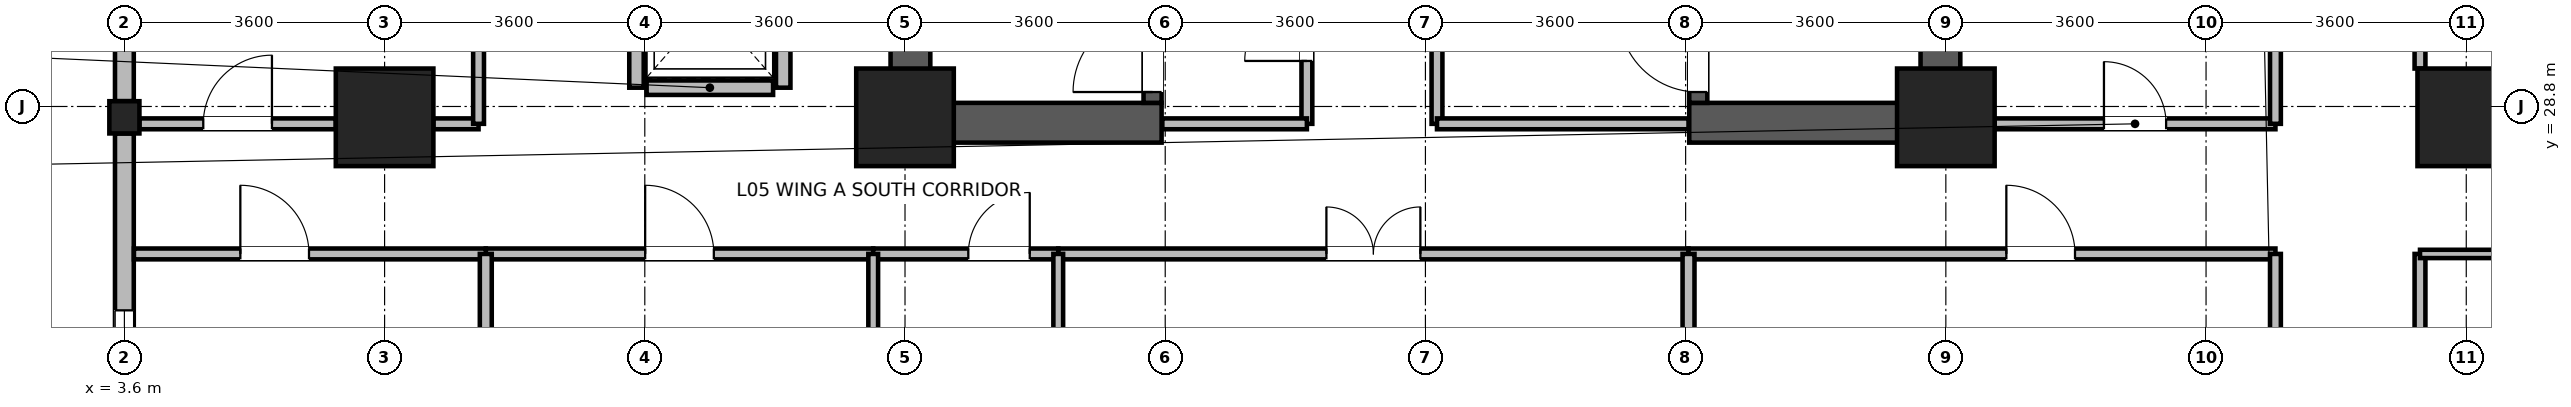
"""IFC4 building model, lengths in metres.
Left out: names, types, materials, properties, quantities, classifications, styles, units other than length and angle.
Written with IfcOpenShell. Run it as: python <this file> out.ifc"""

import sys

from ifc_helpers import new_model, si_unit, direction, frame, frame_2d, origin, origin_2d, place, context, subcontext, project, spatial, rectangle, i_section, extrude, source, transform, mapped, element, fill, save


model = new_model("IFC4")
c1 = context("Model", 3, precision=1e-05, world=origin(), true_north=direction((0.0, 1.0)))
c2 = subcontext(c1, "Body", "Model", "MODEL_VIEW")
j1 = project(units=[si_unit("LENGTHUNIT", "METRE"), si_unit("PLANEANGLEUNIT", "RADIAN")], contexts=[c1])
p1 = place(None, origin())
s1 = spatial("IfcSite", under=j1, at=p1, CompositionType="ELEMENT")
p2 = place(p1, origin())
s2 = spatial("IfcBuilding", under=s1, at=p2, CompositionType="ELEMENT")
p3 = place(p2, frame((0.0, 0.0, 25.3)))
s3 = spatial("IfcBuildingStorey", under=s2, at=p3, CompositionType="ELEMENT", Elevation=25.3)
for number, where, z_axis, x_axis in (
    (1, (14.475, 28.3, 0.0), (0.0, 0.0, 1.0), (0.0, 1.0, 0.0)),
    (2, (28.725, 28.3, 0.0), (0.0, 0.0, 1.0), (0.0, 1.0, 0.0)),
):
    element("IfcWall", number, at=place(p3, frame(where, z_axis=z_axis, x_axis=x_axis)), inside=s3, PredefinedType="SHEAR", context=c2, shape_type="SweptSolid", body=[
        extrude(rectangle(XDim=8.1, YDim=0.55, at=frame_2d((4.05, 0.0))), origin(), (0.0, 0.0, 1.0), 3.45),
    ])
for number, where, z_axis, x_axis in (
    (3, (14.75, 28.575, 0.0), (0.0, 0.0, 1.0), (1.0, 0.0, 0.0)),
    (4, (25.25, 28.575, 0.0), (0.0, 0.0, 1.0), (1.0, 0.0, 0.0)),
):
    element("IfcWall", number, at=place(p3, frame(where, z_axis=z_axis, x_axis=x_axis)), inside=s3, PredefinedType="SHEAR", context=c2, shape_type="SweptSolid", body=[
        extrude(rectangle(XDim=3.2, YDim=0.55, at=frame_2d((1.6, 0.0))), origin(), (0.0, 0.0, 1.0), 3.45),
    ])
p4 = place(p3, frame((17.825, 28.85, 0.0), z_axis=(0.0, 0.0, 1.0), x_axis=(0.0, 1.0, 0.0)))
e5 = element("IfcWall", 5, at=p4, inside=s3, PredefinedType="SHEAR", context=c2, shape_type="SweptSolid", body=[
    extrude(rectangle(XDim=7.0, YDim=0.25, at=frame_2d((3.5, 0.0))), origin(), (0.0, 0.0, 1.0), 3.45),
])
p5 = place(p4, frame((0.15, 0.0, 0.0)))
e6 = element("IfcOpeningElement", 6, at=p5, cuts=e5, PredefinedType="OPENING", context=c2, shape_type="SweptSolid", body=[
    extrude(rectangle(XDim=1.1, YDim=2.08, at=frame_2d((0.55, 1.04))), frame((0.0, 0.135, 0.0), z_axis=(0.0, -1.0, 0.0), x_axis=(1.0, 0.0, 0.0)), (0.0, 0.0, 1.0), 0.27),
])
p6 = place(p3, frame((25.375, 28.85, 0.0), z_axis=(0.0, 0.0, 1.0), x_axis=(0.0, 1.0, 0.0)))
e7 = element("IfcWall", 7, at=p6, inside=s3, PredefinedType="SHEAR", context=c2, shape_type="SweptSolid", body=[
    extrude(rectangle(XDim=7.0, YDim=0.25, at=frame_2d((3.5, 0.0))), origin(), (0.0, 0.0, 1.0), 3.45),
])
p7 = place(p6, frame((0.15, 0.0, 0.0)))
e8 = element("IfcOpeningElement", 8, at=p7, cuts=e7, PredefinedType="OPENING", context=c2, shape_type="SweptSolid", body=[
    extrude(rectangle(XDim=1.1, YDim=2.08, at=frame_2d((0.55, 1.04))), frame((0.0, 0.135, 0.0), z_axis=(0.0, -1.0, 0.0), x_axis=(1.0, 0.0, 0.0)), (0.0, 0.0, 1.0), 0.27),
])
m1 = source(origin(), c2, "Body", "SweptSolid", [
    extrude(rectangle(XDim=1.35, YDim=1.35, at=origin_2d()), origin(), (0.0, 0.0, 1.0), 3.7),
])
for number, where, z_axis, x_axis in (
    (9, (7.2, 28.65, 0.0), (0.0, 0.0, 1.0), (1.0, 0.0, 0.0)),
    (10, (14.4, 28.65, 0.0), (0.0, 0.0, 1.0), (1.0, 0.0, 0.0)),
    (11, (28.8, 28.65, 0.0), (0.0, 0.0, 1.0), (1.0, 0.0, 0.0)),
    (12, (36.0, 28.65, 0.0), (0.0, 0.0, 1.0), (1.0, 0.0, 0.0)),
):
    element("IfcColumn", number, at=place(p3, frame(where, z_axis=z_axis, x_axis=x_axis)), inside=s3, PredefinedType="COLUMN", context=c2, shape_type="MappedRepresentation", body=[
        mapped(m1, transform((0.0, 0.0, 0.0), x_axis=(1.0, 0.0, 0.0), y_axis=(0.0, 1.0, 0.0), z_axis=(0.0, 0.0, 1.0), scale=1.0)),
    ])
m2 = source(origin(), c2, "Body", "SweptSolid", [
    extrude(i_section(OverallWidth=0.416, OverallDepth=0.446, WebThickness=0.029, FlangeThickness=0.04, FilletRadius=0.015, at=origin_2d()), origin(), (0.0, 0.0, 1.0), 3.7),
])
p8 = place(p3, frame((3.6, 28.65, 0.0), z_axis=(0.0, 0.0, 1.0), x_axis=(1.0, 0.0, 0.0)))
e13 = element("IfcColumn", 13, at=p8, inside=s3, PredefinedType="COLUMN", context=c2, shape_type="MappedRepresentation", body=[
    mapped(m2, transform((0.0, 0.0, 0.0), x_axis=(1.0, 0.0, 0.0), y_axis=(0.0, 1.0, 0.0), z_axis=(0.0, 0.0, 1.0), scale=1.0)),
])
p9 = place(p3, frame((3.6, 28.874, 0.0), z_axis=(0.0, 0.0, 1.0), x_axis=(0.0, 1.0, 0.0)))
e14 = element("IfcWall", 14, at=p9, inside=s3, PredefinedType="STANDARD", context=c2, shape_type="SweptSolid", body=[
    extrude(rectangle(XDim=7.052, YDim=0.26, at=frame_2d((3.526, 0.0))), origin(), (0.0, 0.0, 1.0), 2.93),
])
p10 = place(p9, frame((0.863, 0.0, 0.85)))
e15 = element("IfcOpeningElement", 15, at=p10, cuts=e14, PredefinedType="OPENING", context=c2, shape_type="SweptSolid", body=[
    extrude(rectangle(XDim=1.8, YDim=1.85, at=frame_2d((0.9, 0.925))), frame((0.0, 0.14, 0.0), z_axis=(0.0, -1.0, 0.0), x_axis=(1.0, 0.0, 0.0)), (0.0, 0.0, 1.0), 0.28),
])
p11 = place(p9, frame((4.389, 0.0, 0.85)))
e16 = element("IfcOpeningElement", 16, at=p11, cuts=e14, PredefinedType="OPENING", context=c2, shape_type="SweptSolid", body=[
    extrude(rectangle(XDim=1.8, YDim=1.85, at=frame_2d((0.9, 0.925))), frame((0.0, 0.14, 0.0), z_axis=(0.0, -1.0, 0.0), x_axis=(1.0, 0.0, 0.0)), (0.0, 0.0, 1.0), 0.28),
])
p12 = place(p3, frame((3.6, 21.47, 0.0), z_axis=(0.0, 0.0, 1.0), x_axis=(0.0, 1.0, 0.0)))
e17 = element("IfcWall", 17, at=p12, inside=s3, PredefinedType="STANDARD", context=c2, shape_type="SweptSolid", body=[
    extrude(rectangle(XDim=6.956, YDim=0.26, at=frame_2d((3.478, 0.0))), origin(), (0.0, 0.0, 1.0), 3.43),
])
p13 = place(p12, frame((0.389, 0.0, 0.85)))
e18 = element("IfcOpeningElement", 18, at=p13, cuts=e17, PredefinedType="OPENING", context=c2, shape_type="SweptSolid", body=[
    extrude(rectangle(XDim=2.7, YDim=2.05, at=frame_2d((1.35, 1.025))), frame((0.0, 0.14, 0.0), z_axis=(0.0, -1.0, 0.0), x_axis=(1.0, 0.0, 0.0)), (0.0, 0.0, 1.0), 0.28),
])
p14 = place(p12, frame((3.56, 0.0, 0.85)))
e19 = element("IfcOpeningElement", 19, at=p14, cuts=e17, PredefinedType="OPENING", context=c2, shape_type="SweptSolid", body=[
    extrude(rectangle(XDim=0.95, YDim=1.75, at=frame_2d((0.475, 0.875))), frame((0.0, 0.14, 0.0), z_axis=(0.0, -1.0, 0.0), x_axis=(1.0, 0.0, 0.0)), (0.0, 0.0, 1.0), 0.28),
])
p15 = place(p3, frame((10.825, 29.06, 0.0), z_axis=(0.0, 0.0, 1.0), x_axis=(1.0, 0.0, 0.0)))
e20 = element("IfcWall", 20, at=p15, inside=s3, PredefinedType="PARTITIONING", context=c2, shape_type="SweptSolid", body=[
    extrude(rectangle(XDim=1.75, YDim=0.2, at=frame_2d((0.875, 0.0))), origin(), (0.0, 0.0, 1.0), 3.43),
])
for number, where, z_axis, x_axis in (
    (21, (10.685, 29.06, 0.0), (0.0, 0.0, 1.0), (0.0, 1.0, 0.0)),
    (22, (12.715, 29.06, 0.0), (0.0, 0.0, 1.0), (0.0, 1.0, 0.0)),
):
    element("IfcWall", number, at=place(p3, frame(where, z_axis=z_axis, x_axis=x_axis)), inside=s3, PredefinedType="PARTITIONING", context=c2, shape_type="SweptSolid", body=[
        extrude(rectangle(XDim=2.28, YDim=0.2, at=frame_2d((1.14, 0.0))), origin(), (0.0, 0.0, 1.0), 3.43),
    ])
p16 = place(p3, frame((35.36, 22.275, 0.0), z_axis=(0.0, 0.0, 1.0), x_axis=(0.0, 1.0, 0.0)))
e23 = element("IfcWall", 23, at=p16, inside=s3, PredefinedType="PARTITIONING", context=c2, shape_type="SweptSolid", body=[
    extrude(rectangle(XDim=4.485, YDim=0.15, at=frame_2d((2.243, 0.0))), origin(), (0.0, 0.0, 1.0), 3.43),
])
p17 = place(p3, frame((16.52, 26.76, 0.0), z_axis=(0.0, 0.0, 1.0), x_axis=(1.0, 0.0, 0.0)))
e24 = element("IfcWall", 24, at=p17, inside=s3, PredefinedType="PARTITIONING", context=c2, shape_type="SweptSolid", body=[
    extrude(rectangle(XDim=8.72, YDim=0.15, at=frame_2d((4.36, 0.0))), origin(), (0.0, 0.0, 1.0), 3.43),
])
p18 = place(p17, frame((3.71, 0.0, 0.0)))
e25 = element("IfcOpeningElement", 25, at=p18, cuts=e24, PredefinedType="OPENING", context=c2, shape_type="SweptSolid", body=[
    extrude(rectangle(XDim=1.3, YDim=2.12, at=frame_2d((0.65, 1.06))), frame((0.0, 0.085, 0.0), z_axis=(0.0, -1.0, 0.0), x_axis=(1.0, 0.0, 0.0)), (0.0, 0.0, 1.0), 0.17),
])
p19 = place(p3, frame((25.24, 26.76, 0.0), z_axis=(0.0, 0.0, 1.0), x_axis=(1.0, 0.0, 0.0)))
e26 = element("IfcWall", 26, at=p19, inside=s3, PredefinedType="PARTITIONING", context=c2, shape_type="SweptSolid", body=[
    extrude(rectangle(XDim=8.12, YDim=0.15, at=frame_2d((4.06, 0.0))), origin(), (0.0, 0.0, 1.0), 3.43),
])
p20 = place(p19, frame((4.397, 0.0, 0.0)))
e27 = element("IfcOpeningElement", 27, at=p20, cuts=e26, PredefinedType="OPENING", context=c2, shape_type="SweptSolid", body=[
    extrude(rectangle(XDim=0.95, YDim=2.1, at=frame_2d((0.475, 1.05))), frame((0.0, 0.085, 0.0), z_axis=(0.0, -1.0, 0.0), x_axis=(1.0, 0.0, 0.0)), (0.0, 0.0, 1.0), 0.17),
])
p21 = place(p3, frame((35.36, 29.325, 0.0), z_axis=(0.0, 0.0, 1.0), x_axis=(0.0, 1.0, 0.0)))
e28 = element("IfcWall", 28, at=p21, inside=s3, PredefinedType="PARTITIONING", context=c2, shape_type="SweptSolid", body=[
    extrude(rectangle(XDim=6.15, YDim=0.15, at=frame_2d((3.075, 0.0))), origin(), (0.0, 0.0, 1.0), 3.43),
])
p22 = place(p21, frame((2.425, 0.0, 0.0)))
e29 = element("IfcOpeningElement", 29, at=p22, cuts=e28, PredefinedType="OPENING", context=c2, shape_type="SweptSolid", body=[
    extrude(rectangle(XDim=1.3, YDim=2.12, at=frame_2d((0.65, 1.06))), frame((0.0, 0.085, 0.0), z_axis=(0.0, -1.0, 0.0), x_axis=(1.0, 0.0, 0.0)), (0.0, 0.0, 1.0), 0.17),
])
p23 = place(p3, frame((8.6, 26.76, 0.0), z_axis=(0.0, 0.0, 1.0), x_axis=(1.0, 0.0, 0.0)))
e30 = element("IfcWall", 30, at=p23, inside=s3, PredefinedType="PARTITIONING", context=c2, shape_type="SweptSolid", body=[
    extrude(rectangle(XDim=5.36, YDim=0.15, at=frame_2d((2.68, 0.0))), origin(), (0.0, 0.0, 1.0), 3.43),
])
p24 = place(p23, frame((2.205, 0.0, 0.0)))
e31 = element("IfcOpeningElement", 31, at=p24, cuts=e30, PredefinedType="OPENING", context=c2, shape_type="SweptSolid", body=[
    extrude(rectangle(XDim=0.95, YDim=2.1, at=frame_2d((0.475, 1.05))), frame((0.0, 0.085, 0.0), z_axis=(0.0, -1.0, 0.0), x_axis=(1.0, 0.0, 0.0)), (0.0, 0.0, 1.0), 0.17),
])
p25 = place(p3, frame((3.732, 26.76, 0.0), z_axis=(0.0, 0.0, 1.0), x_axis=(1.0, 0.0, 0.0)))
e32 = element("IfcWall", 32, at=p25, inside=s3, PredefinedType="PARTITIONING", context=c2, shape_type="SweptSolid", body=[
    extrude(rectangle(XDim=4.868, YDim=0.15, at=frame_2d((2.434, 0.0))), origin(), (0.0, 0.0, 1.0), 3.43),
])
p26 = place(p25, frame((1.472, 0.0, 0.0)))
e33 = element("IfcOpeningElement", 33, at=p26, cuts=e32, PredefinedType="OPENING", context=c2, shape_type="SweptSolid", body=[
    extrude(rectangle(XDim=0.95, YDim=2.1, at=frame_2d((0.475, 1.05))), frame((0.0, 0.085, 0.0), z_axis=(0.0, -1.0, 0.0), x_axis=(1.0, 0.0, 0.0)), (0.0, 0.0, 1.0), 0.17),
])
p27 = place(p3, frame((3.808, 28.56, 0.0), z_axis=(0.0, 0.0, 1.0), x_axis=(1.0, 0.0, 0.0)))
e34 = element("IfcWall", 34, at=p27, inside=s3, PredefinedType="PARTITIONING", context=c2, shape_type="SweptSolid", body=[
    extrude(rectangle(XDim=2.717, YDim=0.15, at=frame_2d((1.358, 0.0))), origin(), (0.0, 0.0, 1.0), 2.78),
])
p28 = place(p27, frame((0.884, 0.0, 0.0)))
e35 = element("IfcOpeningElement", 35, at=p28, cuts=e34, PredefinedType="OPENING", context=c2, shape_type="SweptSolid", body=[
    extrude(rectangle(XDim=0.95, YDim=2.1, at=frame_2d((0.475, 1.05))), frame((0.0, 0.085, 0.0), z_axis=(0.0, -1.0, 0.0), x_axis=(1.0, 0.0, 0.0)), (0.0, 0.0, 1.0), 0.17),
])
p29 = place(p3, frame((7.875, 28.56, 0.0), z_axis=(0.0, 0.0, 1.0), x_axis=(1.0, 0.0, 0.0)))
e36 = element("IfcWall", 36, at=p29, inside=s3, PredefinedType="PARTITIONING", context=c2, shape_type="SweptSolid", body=[
    extrude(rectangle(XDim=0.625, YDim=0.15, at=frame_2d((0.312, 0.0))), origin(), (0.0, 0.0, 1.0), 2.78),
])
p30 = place(p3, frame((29.475, 28.56, 0.0), z_axis=(0.0, 0.0, 1.0), x_axis=(1.0, 0.0, 0.0)))
e37 = element("IfcWall", 37, at=p30, inside=s3, PredefinedType="PARTITIONING", context=c2, shape_type="SweptSolid", body=[
    extrude(rectangle(XDim=3.885, YDim=0.15, at=frame_2d((1.942, 0.0))), origin(), (0.0, 0.0, 1.0), 2.78),
])
p31 = place(p30, frame((1.512, 0.0, 0.0)))
e38 = element("IfcOpeningElement", 38, at=p31, cuts=e37, PredefinedType="OPENING", context=c2, shape_type="SweptSolid", body=[
    extrude(rectangle(XDim=0.86, YDim=2.02, at=frame_2d((0.43, 1.01))), frame((0.0, 0.085, 0.0), z_axis=(0.0, -1.0, 0.0), x_axis=(1.0, 0.0, 0.0)), (0.0, 0.0, 1.0), 0.17),
])
for number, where, z_axis, x_axis in (
    (39, (8.5, 28.56, 0.0), (0.0, 0.0, 1.0), (0.0, 1.0, 0.0)),
    (40, (33.36, 28.56, 0.0), (0.0, 0.0, 1.0), (0.0, 1.0, 0.0)),
):
    element("IfcWall", number, at=place(p3, frame(where, z_axis=z_axis, x_axis=x_axis)), inside=s3, PredefinedType="PARTITIONING", context=c2, shape_type="SweptSolid", body=[
        extrude(rectangle(XDim=3.84, YDim=0.15, at=frame_2d((1.92, 0.0))), origin(), (0.0, 0.0, 1.0), 3.43),
    ])
p32 = place(p3, frame((33.36, 23.5, 0.0), z_axis=(0.0, 0.0, 1.0), x_axis=(0.0, 1.0, 0.0)))
e41 = element("IfcWall", 41, at=p32, inside=s3, PredefinedType="PARTITIONING", context=c2, shape_type="SweptSolid", body=[
    extrude(rectangle(XDim=3.26, YDim=0.15, at=frame_2d((1.63, 0.0))), origin(), (0.0, 0.0, 1.0), 3.43),
])
p33 = place(p3, frame((19.96, 28.56, 0.0), z_axis=(0.0, 0.0, 1.0), x_axis=(0.0, 1.0, 0.0)))
e42 = element("IfcWall", 42, at=p33, inside=s3, PredefinedType="PARTITIONING", context=c2, shape_type="SweptSolid", body=[
    extrude(rectangle(XDim=2.6, YDim=0.15, at=frame_2d((1.3, 0.0))), origin(), (0.0, 0.0, 1.0), 3.43),
])
p34 = place(p33, frame((0.87, 0.0, 0.0)))
e43 = element("IfcOpeningElement", 43, at=p34, cuts=e42, PredefinedType="OPENING", context=c2, shape_type="SweptSolid", body=[
    extrude(rectangle(XDim=0.86, YDim=2.02, at=frame_2d((0.43, 1.01))), frame((0.0, 0.085, 0.0), z_axis=(0.0, -1.0, 0.0), x_axis=(1.0, 0.0, 0.0)), (0.0, 0.0, 1.0), 0.17),
])
p35 = place(p3, frame((13.96, 26.76, 0.0), z_axis=(0.0, 0.0, 1.0), x_axis=(1.0, 0.0, 0.0)))
e44 = element("IfcWall", 44, at=p35, inside=s3, PredefinedType="PARTITIONING", context=c2, shape_type="SweptSolid", body=[
    extrude(rectangle(XDim=2.56, YDim=0.15, at=frame_2d((1.28, 0.0))), origin(), (0.0, 0.0, 1.0), 3.43),
])
p36 = place(p35, frame((1.316, 0.0, 0.0)))
e45 = element("IfcOpeningElement", 45, at=p36, cuts=e44, PredefinedType="OPENING", context=c2, shape_type="SweptSolid", body=[
    extrude(rectangle(XDim=0.85, YDim=2.04, at=frame_2d((0.425, 1.02))), frame((0.0, 0.085, 0.0), z_axis=(0.0, -1.0, 0.0), x_axis=(1.0, 0.0, 0.0)), (0.0, 0.0, 1.0), 0.17),
])
p37 = place(p3, frame((17.96, 28.56, 0.0), z_axis=(0.0, 0.0, 1.0), x_axis=(1.0, 0.0, 0.0)))
e46 = element("IfcWall", 46, at=p37, inside=s3, PredefinedType="PARTITIONING", context=c2, shape_type="SweptSolid", body=[
    extrude(rectangle(XDim=2.0, YDim=0.15, at=frame_2d((1.0, 0.0))), origin(), (0.0, 0.0, 1.0), 2.23),
])
p38 = place(p3, frame((35.36, 26.76, 0.0), z_axis=(0.0, 0.0, 1.0), x_axis=(1.0, 0.0, 0.0)))
e47 = element("IfcWall", 47, at=p38, inside=s3, PredefinedType="PARTITIONING", context=c2, shape_type="SweptSolid", body=[
    extrude(rectangle(XDim=7.14, YDim=0.115, at=frame_2d((3.57, 0.0))), origin(), (0.0, 0.0, 1.0), 3.43),
])
p39 = place(p3, frame((8.6, 21.732, 0.0), z_axis=(0.0, 0.0, 1.0), x_axis=(0.0, 1.0, 0.0)))
e48 = element("IfcWall", 48, at=p39, inside=s3, PredefinedType="PARTITIONING", context=c2, shape_type="SweptSolid", body=[
    extrude(rectangle(XDim=5.028, YDim=0.165, at=frame_2d((2.514, 0.0))), origin(), (0.0, 0.0, 1.0), 3.43),
])
for number, where, z_axis, x_axis in (
    (49, (13.96, 21.732, 0.0), (0.0, 0.0, 1.0), (0.0, 1.0, 0.0)),
    (50, (16.52, 21.732, 0.0), (0.0, 0.0, 1.0), (0.0, 1.0, 0.0)),
):
    element("IfcWall", number, at=place(p3, frame(where, z_axis=z_axis, x_axis=x_axis)), inside=s3, PredefinedType="PARTITIONING", context=c2, shape_type="SweptSolid", body=[
        extrude(rectangle(XDim=5.028, YDim=0.135, at=frame_2d((2.514, 0.0))), origin(), (0.0, 0.0, 1.0), 3.43),
    ])
p40 = place(p3, frame((25.24, 21.732, 0.0), z_axis=(0.0, 0.0, 1.0), x_axis=(0.0, 1.0, 0.0)))
e51 = element("IfcWall", 51, at=p40, inside=s3, PredefinedType="PARTITIONING", context=c2, shape_type="SweptSolid", body=[
    extrude(rectangle(XDim=5.028, YDim=0.165, at=frame_2d((2.514, 0.0))), origin(), (0.0, 0.0, 1.0), 3.07),
])
p41 = place(p3, frame((21.76, 28.56, 0.0), z_axis=(0.0, 0.0, 1.0), x_axis=(0.0, 1.0, 0.0)))
e52 = element("IfcWall", 52, at=p41, inside=s3, PredefinedType="PARTITIONING", context=c2, shape_type="SweptSolid", body=[
    extrude(rectangle(XDim=4.6, YDim=0.15, at=frame_2d((2.3, 0.0))), origin(), (0.0, 0.0, 1.0), 3.43),
])
p42 = place(p41, frame((1.55, 0.0, 0.0)))
e53 = element("IfcOpeningElement", 53, at=p42, cuts=e52, PredefinedType="OPENING", context=c2, shape_type="SweptSolid", body=[
    extrude(rectangle(XDim=1.5, YDim=2.1, at=frame_2d((0.75, 1.05))), frame((0.0, 0.085, 0.0), z_axis=(0.0, -1.0, 0.0), x_axis=(1.0, 0.0, 0.0)), (0.0, 0.0, 1.0), 0.17),
])
p43 = place(p3, frame((21.76, 28.56, 0.0), z_axis=(0.0, 0.0, 1.0), x_axis=(1.0, 0.0, 0.0)))
e54 = element("IfcWall", 54, at=p43, inside=s3, PredefinedType="PARTITIONING", context=c2, shape_type="SweptSolid", body=[
    extrude(rectangle(XDim=3.48, YDim=0.15, at=frame_2d((1.74, 0.0))), origin(), (0.0, 0.0, 1.0), 2.23),
])
p44 = place(p14, origin())
e55 = element("IfcWindow", 55, at=p44, inside=s3, PartitioningType="SINGLE_PANEL", PredefinedType="WINDOW", context=c2, shape_type="SweptSolid", body=[
    extrude(rectangle(XDim=0.95, YDim=1.75, at=frame_2d((0.475, 0.875))), frame((0.0, 0.03, 0.0), z_axis=(0.0, -1.0, 0.0), x_axis=(1.0, 0.0, 0.0)), (0.0, 0.0, 1.0), 0.06),
])
fill(e19, e55)
p45 = place(p5, origin())
e56 = element("IfcDoor", 56, at=p45, inside=s3, OperationType="SINGLE_SWING_LEFT", PredefinedType="DOOR", context=c2, shape_type="SweptSolid", body=[
    extrude(rectangle(XDim=1.1, YDim=2.08, at=frame_2d((0.55, 1.04))), frame((0.0, 0.025, 0.0), z_axis=(0.0, -1.0, 0.0), x_axis=(1.0, 0.0, 0.0)), (0.0, 0.0, 1.0), 0.05),
])
fill(e6, e56)
p46 = place(p7, origin())
e57 = element("IfcDoor", 57, at=p46, inside=s3, OperationType="SINGLE_SWING_RIGHT", PredefinedType="DOOR", context=c2, shape_type="SweptSolid", body=[
    extrude(rectangle(XDim=1.1, YDim=2.08, at=frame_2d((0.55, 1.04))), frame((0.0, 0.025, 0.0), z_axis=(0.0, -1.0, 0.0), x_axis=(1.0, 0.0, 0.0)), (0.0, 0.0, 1.0), 0.05),
])
fill(e8, e57)
p47 = place(p18, origin())
e58 = element("IfcDoor", 58, at=p47, inside=s3, OperationType="DOUBLE_DOOR_SINGLE_SWING", PredefinedType="DOOR", context=c2, shape_type="SweptSolid", body=[
    extrude(rectangle(XDim=1.3, YDim=2.12, at=frame_2d((0.65, 1.06))), frame((0.0, 0.025, 0.0), z_axis=(0.0, -1.0, 0.0), x_axis=(1.0, 0.0, 0.0)), (0.0, 0.0, 1.0), 0.05),
])
fill(e25, e58)
p48 = place(p20, origin())
e59 = element("IfcDoor", 59, at=p48, inside=s3, OperationType="SINGLE_SWING_LEFT", PredefinedType="DOOR", context=c2, shape_type="SweptSolid", body=[
    extrude(rectangle(XDim=0.95, YDim=2.1, at=frame_2d((0.475, 1.05))), frame((0.0, 0.025, 0.0), z_axis=(0.0, -1.0, 0.0), x_axis=(1.0, 0.0, 0.0)), (0.0, 0.0, 1.0), 0.05),
])
fill(e27, e59)
p49 = place(p24, origin())
e60 = element("IfcDoor", 60, at=p49, inside=s3, OperationType="SINGLE_SWING_LEFT", PredefinedType="DOOR", context=c2, shape_type="SweptSolid", body=[
    extrude(rectangle(XDim=0.95, YDim=2.1, at=frame_2d((0.475, 1.05))), frame((0.0, 0.025, 0.0), z_axis=(0.0, -1.0, 0.0), x_axis=(1.0, 0.0, 0.0)), (0.0, 0.0, 1.0), 0.05),
])
fill(e31, e60)
p50 = place(p26, origin())
e61 = element("IfcDoor", 61, at=p50, inside=s3, OperationType="SINGLE_SWING_LEFT", PredefinedType="DOOR", context=c2, shape_type="SweptSolid", body=[
    extrude(rectangle(XDim=0.95, YDim=2.1, at=frame_2d((0.475, 1.05))), frame((0.0, 0.025, 0.0), z_axis=(0.0, -1.0, 0.0), x_axis=(1.0, 0.0, 0.0)), (0.0, 0.0, 1.0), 0.05),
])
fill(e33, e61)
p51 = place(p28, origin())
e62 = element("IfcDoor", 62, at=p51, inside=s3, OperationType="SINGLE_SWING_RIGHT", PredefinedType="DOOR", context=c2, shape_type="SweptSolid", body=[
    extrude(rectangle(XDim=0.95, YDim=2.1, at=frame_2d((0.475, 1.05))), frame((0.0, 0.025, 0.0), z_axis=(0.0, -1.0, 0.0), x_axis=(1.0, 0.0, 0.0)), (0.0, 0.0, 1.0), 0.05),
])
fill(e35, e62)
p52 = place(p31, origin())
e63 = element("IfcDoor", 63, at=p52, inside=s3, OperationType="SINGLE_SWING_LEFT", PredefinedType="DOOR", context=c2, shape_type="SweptSolid", body=[
    extrude(rectangle(XDim=0.86, YDim=2.02, at=frame_2d((0.43, 1.01))), frame((0.0, 0.025, 0.0), z_axis=(0.0, -1.0, 0.0), x_axis=(1.0, 0.0, 0.0)), (0.0, 0.0, 1.0), 0.05),
])
fill(e38, e63)
p53 = place(p34, origin())
e64 = element("IfcDoor", 64, at=p53, inside=s3, OperationType="SINGLE_SWING_LEFT", PredefinedType="DOOR", context=c2, shape_type="SweptSolid", body=[
    extrude(rectangle(XDim=0.86, YDim=2.02, at=frame_2d((0.43, 1.01))), frame((0.0, 0.025, 0.0), z_axis=(0.0, -1.0, 0.0), x_axis=(1.0, 0.0, 0.0)), (0.0, 0.0, 1.0), 0.05),
])
fill(e43, e64)
p54 = place(p36, origin())
e65 = element("IfcDoor", 65, at=p54, inside=s3, OperationType="SINGLE_SWING_RIGHT", PredefinedType="DOOR", context=c2, shape_type="SweptSolid", body=[
    extrude(rectangle(XDim=0.85, YDim=2.04, at=frame_2d((0.425, 1.02))), frame((0.0, 0.025, 0.0), z_axis=(0.0, -1.0, 0.0), x_axis=(1.0, 0.0, 0.0)), (0.0, 0.0, 1.0), 0.05),
])
fill(e45, e65)
save(model, sys.argv[1])
